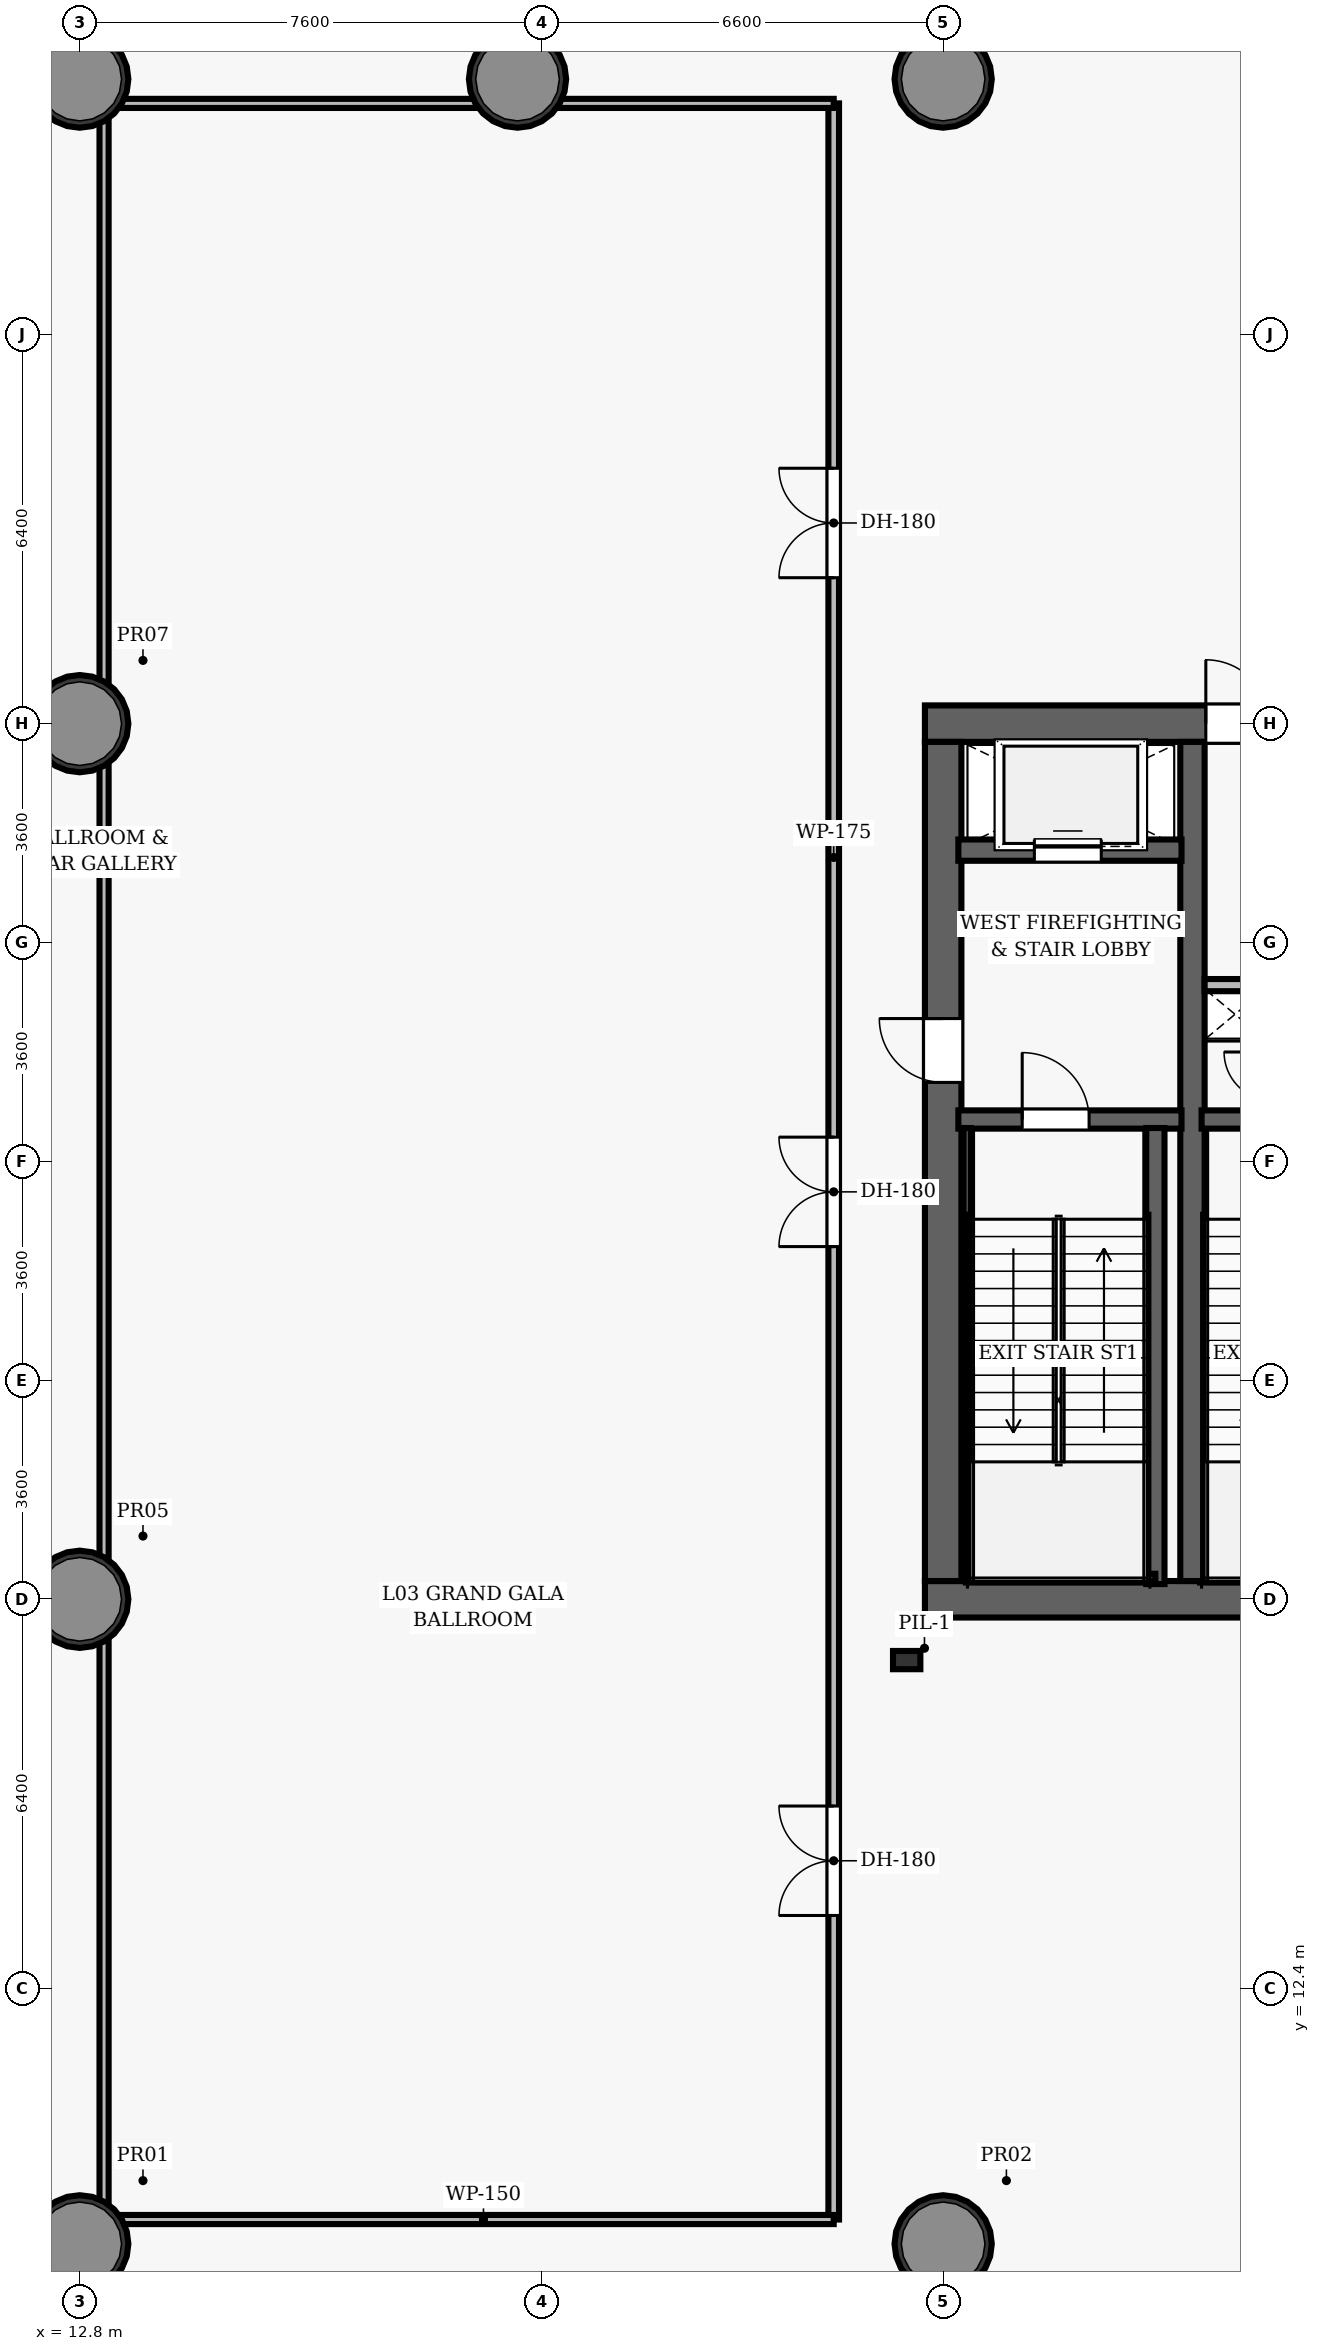
"""IFC4 building model, lengths in metres.
Left out: names, types, materials, properties, quantities, classifications, styles, units other than length and angle.
Written with IfcOpenShell. Run it as: python <this file> out.ifc"""

import sys

from ifc_helpers import new_model, si_unit, direction, frame, frame_2d, origin, origin_2d, place, context, subcontext, project, spatial, rectangle, hollow_circle, extrude, element, fill, save


model = new_model("IFC4")
c1 = context("Model", 3, precision=1e-05, world=origin(), true_north=direction((0.0, 1.0)))
c2 = subcontext(c1, "Body", "Model", "MODEL_VIEW")
j1 = project(units=[si_unit("LENGTHUNIT", "METRE"), si_unit("PLANEANGLEUNIT", "RADIAN")], contexts=[c1])
p1 = place(None, origin())
s1 = spatial("IfcSite", under=j1, at=p1, CompositionType="ELEMENT")
p2 = place(p1, origin())
s2 = spatial("IfcBuilding", under=s1, at=p2, CompositionType="ELEMENT")
p3 = place(p2, frame((0.0, 0.0, 18.6)))
s3 = spatial("IfcBuildingStorey", under=s2, at=p3, CompositionType="ELEMENT", Elevation=18.6)
p4 = place(p3, frame((26.7, 18.8, 0.0), z_axis=(0.0, 0.0, 1.0), x_axis=(1.0, 0.0, 0.0)))
e1 = element("IfcWall", 1, at=p4, inside=s3, PredefinedType="SHEAR", context=c2, shape_type="SweptSolid", body=[
    extrude(rectangle(XDim=22.6, YDim=0.6, at=frame_2d((11.3, 0.0))), origin(), (0.0, 0.0, 1.0), 5.4),
])
p5 = place(p4, frame((14.52, 0.0, 0.0)))
e2 = element("IfcOpeningElement", 2, at=p5, cuts=e1, PredefinedType="OPENING", context=c2, shape_type="SweptSolid", body=[
    extrude(rectangle(XDim=1.05, YDim=2.15, at=frame_2d((0.525, 1.075))), frame((0.0, 0.31, 0.0), z_axis=(0.0, -1.0, 0.0), x_axis=(1.0, 0.0, 0.0)), (0.0, 0.0, 1.0), 0.62),
])
p6 = place(p3, frame((26.7, 33.2, 0.0), z_axis=(0.0, 0.0, 1.0), x_axis=(1.0, 0.0, 0.0)))
e3 = element("IfcWall", 3, at=p6, inside=s3, PredefinedType="SHEAR", context=c2, shape_type="SweptSolid", body=[
    extrude(rectangle(XDim=22.6, YDim=0.6, at=frame_2d((11.3, 0.0))), origin(), (0.0, 0.0, 1.0), 5.4),
])
p7 = place(p6, frame((4.62, 0.0, 0.0)))
e4 = element("IfcOpeningElement", 4, at=p7, cuts=e3, PredefinedType="OPENING", context=c2, shape_type="SweptSolid", body=[
    extrude(rectangle(XDim=1.05, YDim=2.15, at=frame_2d((0.525, 1.075))), frame((0.0, 0.31, 0.0), z_axis=(0.0, -1.0, 0.0), x_axis=(1.0, 0.0, 0.0)), (0.0, 0.0, 1.0), 0.62),
])
p8 = place(p6, frame((14.52, 0.0, 0.0)))
e5 = element("IfcOpeningElement", 5, at=p8, cuts=e3, PredefinedType="OPENING", context=c2, shape_type="SweptSolid", body=[
    extrude(rectangle(XDim=1.05, YDim=2.15, at=frame_2d((0.525, 1.075))), frame((0.0, 0.31, 0.0), z_axis=(0.0, -1.0, 0.0), x_axis=(1.0, 0.0, 0.0)), (0.0, 0.0, 1.0), 0.62),
])
p9 = place(p3, frame((27.0, 19.1, 0.0), z_axis=(0.0, 0.0, 1.0), x_axis=(0.0, 1.0, 0.0)))
e6 = element("IfcWall", 6, at=p9, inside=s3, PredefinedType="SHEAR", context=c2, shape_type="SweptSolid", body=[
    extrude(rectangle(XDim=13.8, YDim=0.6, at=frame_2d((6.9, 0.0))), origin(), (0.0, 0.0, 1.0), 5.4),
])
p10 = place(p9, frame((8.2, 0.0, 0.0)))
e7 = element("IfcOpeningElement", 7, at=p10, cuts=e6, PredefinedType="OPENING", context=c2, shape_type="SweptSolid", body=[
    extrude(rectangle(XDim=1.05, YDim=2.15, at=frame_2d((0.525, 1.075))), frame((0.0, 0.31, 0.0), z_axis=(0.0, -1.0, 0.0), x_axis=(1.0, 0.0, 0.0)), (0.0, 0.0, 1.0), 0.62),
])
p11 = place(p3, frame((31.1, 19.1, 0.0), z_axis=(0.0, 0.0, 1.0), x_axis=(0.0, 1.0, 0.0)))
e8 = element("IfcWall", 8, at=p11, inside=s3, PredefinedType="SHEAR", context=c2, shape_type="SweptSolid", body=[
    extrude(rectangle(XDim=13.8, YDim=0.4, at=frame_2d((6.9, 0.0))), origin(), (0.0, 0.0, 1.0), 5.4),
])
for number, where, z_axis, x_axis in (
    (9, (12.8, 8.2, 0.0), (0.0, 0.0, 1.0), (1.0, 0.0, 0.0)),
    (10, (27.0, 8.2, 0.0), (0.0, 0.0, 1.0), (1.0, 0.0, 0.0)),
    (11, (12.8, 18.8, 0.0), (0.0, 0.0, 1.0), (1.0, 0.0, 0.0)),
    (12, (12.8, 33.2, 0.0), (0.0, 0.0, 1.0), (1.0, 0.0, 0.0)),
    (13, (12.8, 43.8, 0.0), (0.0, 0.0, 1.0), (1.0, 0.0, 0.0)),
    (14, (20.0, 43.8, 0.0), (0.0, 0.0, 1.0), (1.0, 0.0, 0.0)),
    (15, (27.0, 43.8, 0.0), (0.0, 0.0, 1.0), (1.0, 0.0, 0.0)),
):
    element("IfcColumn", number, at=place(p3, frame(where, z_axis=z_axis, x_axis=x_axis)), inside=s3, PredefinedType="COLUMN", context=c2, shape_type="SweptSolid", body=[
        extrude(hollow_circle(Radius=0.8, WallThickness=0.06, at=origin_2d()), origin(), (0.0, 0.0, 1.0), 5.4),
    ])
p12 = place(p3, frame((27.25, 26.69, 0.0), z_axis=(0.0, 0.0, 1.0), x_axis=(1.0, 0.0, 0.0)))
e16 = element("IfcWall", 16, at=p12, inside=s3, PredefinedType="SHEAR", context=c2, shape_type="SweptSolid", body=[
    extrude(rectangle(XDim=3.67, YDim=0.3, at=frame_2d((1.835, 0.0))), origin(), (0.0, 0.0, 1.0), 5.4),
])
p13 = place(p12, frame((1.05, 0.0, 0.0)))
e17 = element("IfcOpeningElement", 17, at=p13, cuts=e16, PredefinedType="OPENING", context=c2, shape_type="SweptSolid", body=[
    extrude(rectangle(XDim=1.1, YDim=2.15, at=frame_2d((0.55, 1.075))), frame((0.0, 0.16, 0.0), z_axis=(0.0, -1.0, 0.0), x_axis=(1.0, 0.0, 0.0)), (0.0, 0.0, 1.0), 0.32),
])
p14 = place(p3, frame((30.49, 19.05, 0.0), z_axis=(0.0, 0.0, 1.0), x_axis=(0.0, 1.0, 0.0)))
e18 = element("IfcWall", 18, at=p14, inside=s3, PredefinedType="SHEAR", context=c2, shape_type="SweptSolid", body=[
    extrude(rectangle(XDim=7.5, YDim=0.3, at=frame_2d((3.75, 0.0))), origin(), (0.0, 0.0, 1.0), 5.4),
])
p15 = place(p3, frame((27.395, 19.1, 0.0), z_axis=(0.0, 0.0, 1.0), x_axis=(0.0, 1.0, 0.0)))
e19 = element("IfcWall", 19, at=p15, inside=s3, PredefinedType="SHEAR", context=c2, shape_type="SweptSolid", body=[
    extrude(rectangle(XDim=7.45, YDim=0.12, at=frame_2d((3.725, 0.0))), origin(), (0.0, 0.0, 1.0), 5.4),
])
p16 = place(p3, frame((27.395, 19.16, 0.0), z_axis=(0.0, 0.0, 1.0), x_axis=(1.0, 0.0, 0.0)))
e20 = element("IfcWall", 20, at=p16, inside=s3, PredefinedType="SHEAR", context=c2, shape_type="SweptSolid", body=[
    extrude(rectangle(XDim=3.095, YDim=0.12, at=frame_2d((1.547, 0.0))), origin(), (0.0, 0.0, 1.0), 5.4),
])
p17 = place(p3, frame((27.25, 31.12, 0.0), z_axis=(0.0, 0.0, 1.0), x_axis=(1.0, 0.0, 0.0)))
e21 = element("IfcWall", 21, at=p17, inside=s3, PredefinedType="SHEAR", context=c2, shape_type="SweptSolid", body=[
    extrude(rectangle(XDim=3.67, YDim=0.35, at=frame_2d((1.835, 0.0))), origin(), (0.0, 0.0, 1.0), 4.11),
])
p18 = place(p17, frame((1.25, 0.0, 0.0)))
e22 = element("IfcOpeningElement", 22, at=p18, cuts=e21, PredefinedType="OPENING", context=c2, shape_type="SweptSolid", body=[
    extrude(rectangle(XDim=1.1, YDim=2.15, at=frame_2d((0.55, 1.075))), frame((0.0, 0.185, 0.0), z_axis=(0.0, -1.0, 0.0), x_axis=(1.0, 0.0, 0.0)), (0.0, 0.0, 1.0), 0.37),
])
p19 = place(p3, frame((31.25, 26.69, 0.0), z_axis=(0.0, 0.0, 1.0), x_axis=(1.0, 0.0, 0.0)))
e23 = element("IfcWall", 23, at=p19, inside=s3, PredefinedType="SHEAR", context=c2, shape_type="SweptSolid", body=[
    extrude(rectangle(XDim=3.56, YDim=0.3, at=frame_2d((1.78, 0.0))), origin(), (0.0, 0.0, 1.0), 5.4),
])
p20 = place(p19, frame((1.55, 0.0, 0.0)))
e24 = element("IfcOpeningElement", 24, at=p20, cuts=e23, PredefinedType="OPENING", context=c2, shape_type="SweptSolid", body=[
    extrude(rectangle(XDim=1.1, YDim=2.15, at=frame_2d((0.55, 1.075))), frame((0.0, 0.16, 0.0), z_axis=(0.0, -1.0, 0.0), x_axis=(1.0, 0.0, 0.0)), (0.0, 0.0, 1.0), 0.32),
])
p21 = place(p3, frame((31.3, 19.16, 0.0), z_axis=(0.0, 0.0, 1.0), x_axis=(1.0, 0.0, 0.0)))
e25 = element("IfcWall", 25, at=p21, inside=s3, PredefinedType="SHEAR", context=c2, shape_type="SweptSolid", body=[
    extrude(rectangle(XDim=3.04, YDim=0.12, at=frame_2d((1.52, 0.0))), origin(), (0.0, 0.0, 1.0), 5.4),
])
p22 = place(p3, frame((31.3, 28.9, 0.0), z_axis=(0.0, 0.0, 1.0), x_axis=(1.0, 0.0, 0.0)))
e26 = element("IfcWall", 26, at=p22, inside=s3, PredefinedType="PARTITIONING", context=c2, shape_type="SweptSolid", body=[
    extrude(rectangle(XDim=1.12, YDim=0.2, at=frame_2d((0.56, 0.0))), origin(), (0.0, 0.0, 1.0), 4.11),
])
p23 = place(p3, frame((26.4, 17.8, 0.0), z_axis=(0.0, 0.0, 1.0), x_axis=(1.0, 0.0, 0.0)))
e27 = element("IfcColumn", 27, at=p23, inside=s3, PredefinedType="PILASTER", context=c2, shape_type="SweptSolid", body=[
    extrude(rectangle(XDim=0.45, YDim=0.3, at=origin_2d()), origin(), (0.0, 0.0, 1.0), 5.4),
])
p24 = place(p3, frame((25.2, 8.6, 0.0), z_axis=(0.0, 0.0, 1.0), x_axis=(0.0, 1.0, 0.0)))
e28 = element("IfcWall", 28, at=p24, inside=s3, PredefinedType="PARTITIONING", context=c2, shape_type="SweptSolid", body=[
    extrude(rectangle(XDim=34.8, YDim=0.175, at=frame_2d((17.4, 0.0))), origin(), (0.0, 0.0, 1.0), 4.11),
])
p25 = place(p24, frame((5.0, 0.0, 0.0)))
e29 = element("IfcOpeningElement", 29, at=p25, cuts=e28, PredefinedType="OPENING", context=c2, shape_type="SweptSolid", body=[
    extrude(rectangle(XDim=1.8, YDim=2.35, at=frame_2d((0.9, 1.175))), frame((0.0, 0.097, 0.0), z_axis=(0.0, -1.0, 0.0), x_axis=(1.0, 0.0, 0.0)), (0.0, 0.0, 1.0), 0.195),
])
p26 = place(p24, frame((16.0, 0.0, 0.0)))
e30 = element("IfcOpeningElement", 30, at=p26, cuts=e28, PredefinedType="OPENING", context=c2, shape_type="SweptSolid", body=[
    extrude(rectangle(XDim=1.8, YDim=2.35, at=frame_2d((0.9, 1.175))), frame((0.0, 0.097, 0.0), z_axis=(0.0, -1.0, 0.0), x_axis=(1.0, 0.0, 0.0)), (0.0, 0.0, 1.0), 0.195),
])
p27 = place(p24, frame((27.0, 0.0, 0.0)))
e31 = element("IfcOpeningElement", 31, at=p27, cuts=e28, PredefinedType="OPENING", context=c2, shape_type="SweptSolid", body=[
    extrude(rectangle(XDim=1.8, YDim=2.35, at=frame_2d((0.9, 1.175))), frame((0.0, 0.097, 0.0), z_axis=(0.0, -1.0, 0.0), x_axis=(1.0, 0.0, 0.0)), (0.0, 0.0, 1.0), 0.195),
])
for number, where, z_axis, x_axis in (
    (32, (13.2, 8.6, 0.0), (0.0, 0.0, 1.0), (1.0, 0.0, 0.0)),
    (33, (13.2, 43.4, 0.0), (0.0, 0.0, 1.0), (1.0, 0.0, 0.0)),
):
    element("IfcWall", number, at=place(p3, frame(where, z_axis=z_axis, x_axis=x_axis)), inside=s3, PredefinedType="PARTITIONING", context=c2, shape_type="SweptSolid", body=[
        extrude(rectangle(XDim=12.0, YDim=0.15, at=frame_2d((6.0, 0.0))), origin(), (0.0, 0.0, 1.0), 4.11),
    ])
p28 = place(p3, frame((13.2, 8.6, 0.0), z_axis=(0.0, 0.0, 1.0), x_axis=(0.0, 1.0, 0.0)))
e34 = element("IfcWall", 34, at=p28, inside=s3, PredefinedType="PARTITIONING", context=c2, shape_type="SweptSolid", body=[
    extrude(rectangle(XDim=34.8, YDim=0.15, at=frame_2d((17.4, 0.0))), origin(), (0.0, 0.0, 1.0), 4.11),
])
p29 = place(p13, origin())
e35 = element("IfcDoor", 35, at=p29, inside=s3, OperationType="SINGLE_SWING_LEFT", PredefinedType="DOOR", context=c2, shape_type="SweptSolid", body=[
    extrude(rectangle(XDim=1.1, YDim=2.15, at=frame_2d((0.55, 1.075))), frame((0.0, 0.025, 0.0), z_axis=(0.0, -1.0, 0.0), x_axis=(1.0, 0.0, 0.0)), (0.0, 0.0, 1.0), 0.05),
])
fill(e17, e35)
p30 = place(p10, origin())
e36 = element("IfcDoor", 36, at=p30, inside=s3, OperationType="SINGLE_SWING_RIGHT", PredefinedType="DOOR", context=c2, shape_type="SweptSolid", body=[
    extrude(rectangle(XDim=1.05, YDim=2.15, at=frame_2d((0.525, 1.075))), frame((0.0, 0.025, 0.0), z_axis=(0.0, -1.0, 0.0), x_axis=(1.0, 0.0, 0.0)), (0.0, 0.0, 1.0), 0.05),
])
fill(e7, e36)
p31 = place(p7, origin())
e37 = element("IfcDoor", 37, at=p31, inside=s3, OperationType="SINGLE_SWING_LEFT", PredefinedType="DOOR", context=c2, shape_type="SweptSolid", body=[
    extrude(rectangle(XDim=1.05, YDim=2.15, at=frame_2d((0.525, 1.075))), frame((0.0, 0.025, 0.0), z_axis=(0.0, -1.0, 0.0), x_axis=(1.0, 0.0, 0.0)), (0.0, 0.0, 1.0), 0.05),
])
fill(e4, e37)
p32 = place(p25, origin())
e38 = element("IfcDoor", 38, at=p32, inside=s3, OperationType="DOUBLE_DOOR_SINGLE_SWING", PredefinedType="DOOR", context=c2, shape_type="SweptSolid", body=[
    extrude(rectangle(XDim=1.8, YDim=2.35, at=frame_2d((0.9, 1.175))), frame((0.0, 0.025, 0.0), z_axis=(0.0, -1.0, 0.0), x_axis=(1.0, 0.0, 0.0)), (0.0, 0.0, 1.0), 0.05),
])
fill(e29, e38)
p33 = place(p26, origin())
e39 = element("IfcDoor", 39, at=p33, inside=s3, OperationType="DOUBLE_DOOR_SINGLE_SWING", PredefinedType="DOOR", context=c2, shape_type="SweptSolid", body=[
    extrude(rectangle(XDim=1.8, YDim=2.35, at=frame_2d((0.9, 1.175))), frame((0.0, 0.025, 0.0), z_axis=(0.0, -1.0, 0.0), x_axis=(1.0, 0.0, 0.0)), (0.0, 0.0, 1.0), 0.05),
])
fill(e30, e39)
p34 = place(p27, origin())
e40 = element("IfcDoor", 40, at=p34, inside=s3, OperationType="DOUBLE_DOOR_SINGLE_SWING", PredefinedType="DOOR", context=c2, shape_type="SweptSolid", body=[
    extrude(rectangle(XDim=1.8, YDim=2.35, at=frame_2d((0.9, 1.175))), frame((0.0, 0.025, 0.0), z_axis=(0.0, -1.0, 0.0), x_axis=(1.0, 0.0, 0.0)), (0.0, 0.0, 1.0), 0.05),
])
fill(e31, e40)
p35 = place(p18, origin())
e41 = element("IfcDoor", 41, at=p35, inside=s3, OperationType="SLIDING_TO_LEFT", PredefinedType="DOOR", context=c2, shape_type="SweptSolid", body=[
    extrude(rectangle(XDim=1.1, YDim=2.15, at=frame_2d((0.55, 1.075))), frame((0.0, 0.025, 0.0), z_axis=(0.0, -1.0, 0.0), x_axis=(1.0, 0.0, 0.0)), (0.0, 0.0, 1.0), 0.05),
])
fill(e22, e41)
save(model, sys.argv[1])
